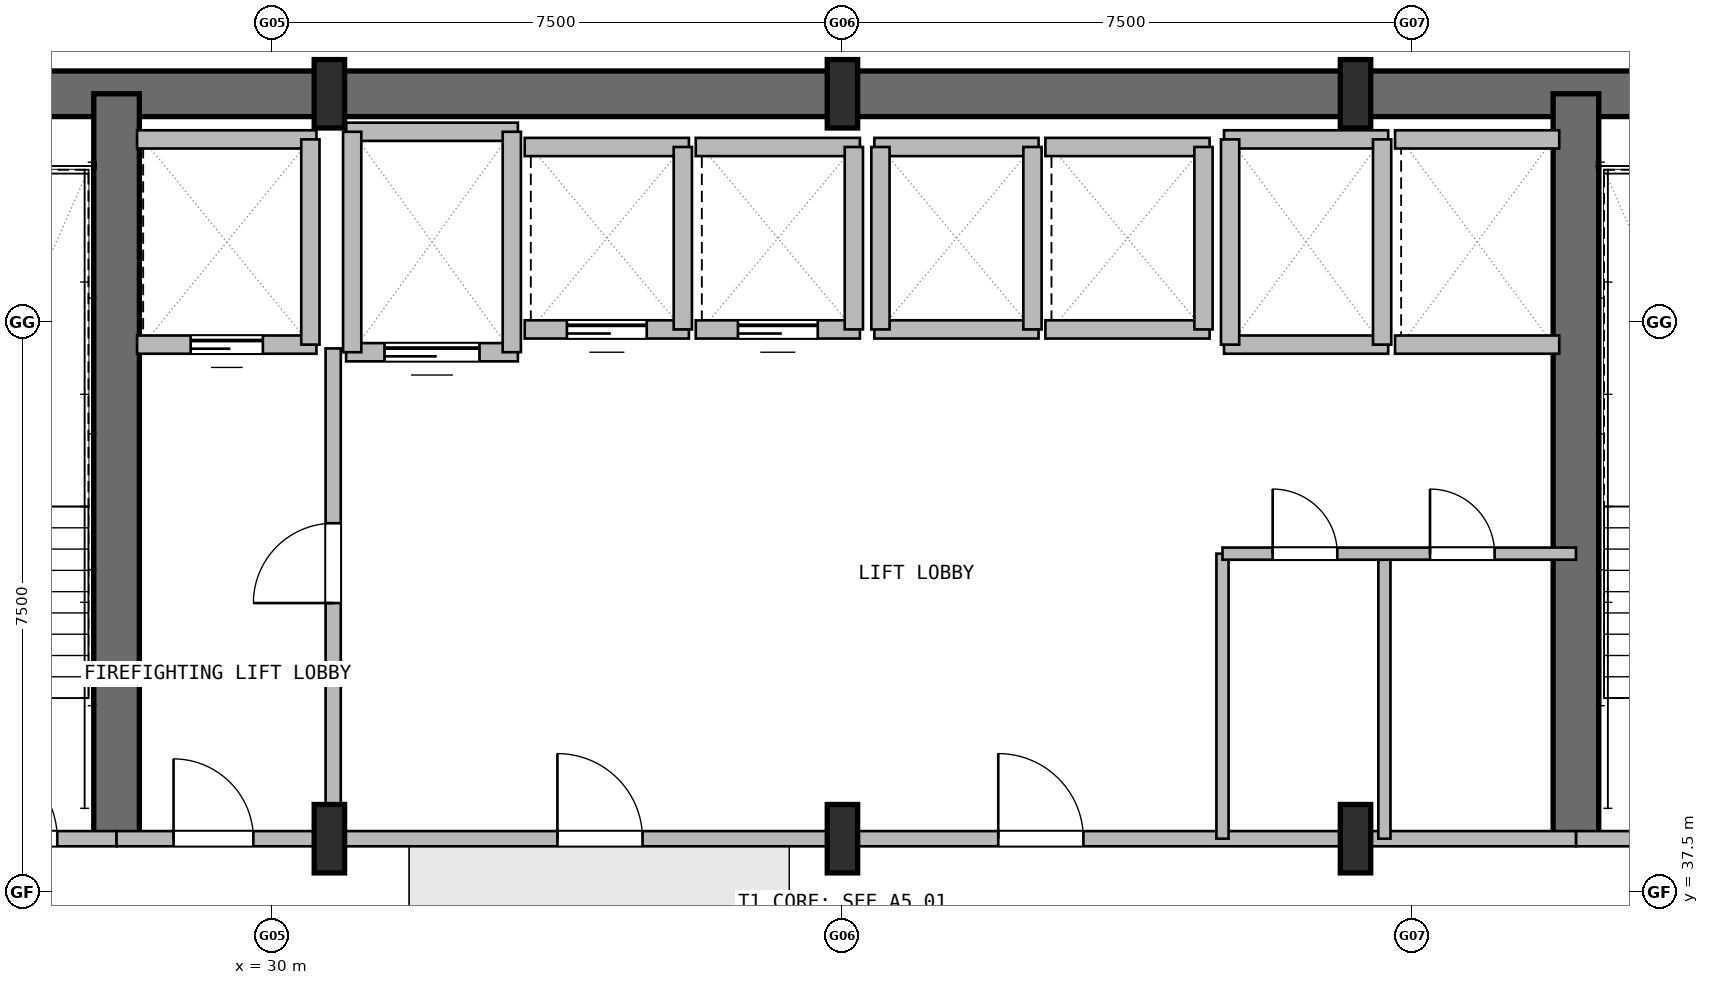
"""IFC4 building model, lengths in metres.
Left out: names, types, materials, properties, quantities, classifications, styles, units other than length and angle.
Written with IfcOpenShell. Run it as: python <this file> out.ifc"""

import sys

from ifc_helpers import new_model, si_unit, direction, frame, frame_2d, origin, origin_2d, place, context, subcontext, project, spatial, rectangle, i_section, extrude, element, fill, save


model = new_model("IFC4")
c1 = context("Model", 3, precision=1e-05, world=origin(), true_north=direction((0.0, 1.0)))
c2 = subcontext(c1, "Body", "Model", "MODEL_VIEW")
j1 = project(units=[si_unit("LENGTHUNIT", "METRE"), si_unit("PLANEANGLEUNIT", "RADIAN")], contexts=[c1])
p1 = place(None, origin())
s1 = spatial("IfcSite", under=j1, at=p1, CompositionType="ELEMENT")
p2 = place(p1, origin())
s2 = spatial("IfcBuilding", under=s1, at=p2, CompositionType="ELEMENT")
p3 = place(p2, frame((0.0, 0.0, 30.6)))
s3 = spatial("IfcBuildingStorey", under=s2, at=p3, CompositionType="ELEMENT", Elevation=30.6)
p4 = place(p3, frame((23.7, 48.0, 0.0), z_axis=(0.0, 0.0, 1.0), x_axis=(1.0, 0.0, 0.0)))
e1 = element("IfcWall", 1, at=p4, inside=s3, PredefinedType="SHEAR", context=c2, shape_type="SweptSolid", body=[
    extrude(rectangle(XDim=27.6, YDim=0.6, at=frame_2d((13.8, 0.0))), origin(), (0.0, 0.0, 1.0), 3.3),
])
for number, where, z_axis, x_axis in (
    (2, (27.95, 38.2, 0.0), (0.0, 0.0, 1.0), (0.0, 1.0, 0.0)),
    (3, (47.15, 38.2, 0.0), (0.0, 0.0, 1.0), (0.0, 1.0, 0.0)),
):
    element("IfcWall", number, at=place(p3, frame(where, z_axis=z_axis, x_axis=x_axis)), inside=s3, PredefinedType="SHEAR", context=c2, shape_type="SweptSolid", body=[
        extrude(rectangle(XDim=9.8, YDim=0.6, at=frame_2d((4.9, 0.0))), origin(), (0.0, 0.0, 1.0), 3.3),
    ])
for number, where, z_axis, x_axis in (
    (4, (30.75, 38.2, 0.0), (0.0, 0.0, 1.0), (1.0, 0.0, 0.0)),
    (5, (30.75, 48.0, 0.0), (0.0, 0.0, 1.0), (1.0, 0.0, 0.0)),
    (6, (37.5, 38.2, 0.0), (0.0, 0.0, 1.0), (1.0, 0.0, 0.0)),
    (7, (37.5, 48.0, 0.0), (0.0, 0.0, 1.0), (1.0, 0.0, 0.0)),
    (8, (44.25, 38.2, 0.0), (0.0, 0.0, 1.0), (1.0, 0.0, 0.0)),
    (9, (44.25, 48.0, 0.0), (0.0, 0.0, 1.0), (1.0, 0.0, 0.0)),
):
    element("IfcColumn", number, at=place(p3, frame(where, z_axis=z_axis, x_axis=x_axis)), inside=s3, PredefinedType="COLUMN", context=c2, shape_type="SweptSolid", body=[
        extrude(i_section(OverallWidth=0.4, OverallDepth=0.9, WebThickness=0.02, FlangeThickness=0.036, at=origin_2d()), origin(), (0.0, 0.0, 1.0), 3.3),
    ])
p5 = place(p3, frame((24.0, 38.2, 0.0), z_axis=(0.0, 0.0, 1.0), x_axis=(1.0, 0.0, 0.0)))
e10 = element("IfcWall", 10, at=p5, inside=s3, PredefinedType="PARTITIONING", context=c2, shape_type="SweptSolid", body=[
    extrude(rectangle(XDim=3.95, YDim=0.2, at=frame_2d((1.975, 0.0))), origin(), (0.0, 0.0, 1.0), 2.33),
])
p6 = place(p5, frame((2.05, 0.0, 0.0)))
e11 = element("IfcOpeningElement", 11, at=p6, cuts=e10, PredefinedType="OPENING", context=c2, shape_type="SweptSolid", body=[
    extrude(rectangle(XDim=1.12, YDim=2.1, at=frame_2d((0.56, 1.05))), frame((0.0, 0.11, 0.0), z_axis=(0.0, -1.0, 0.0), x_axis=(1.0, 0.0, 0.0)), (0.0, 0.0, 1.0), 0.22),
])
p7 = place(p3, frame((47.15, 38.2, 0.0), z_axis=(0.0, 0.0, 1.0), x_axis=(1.0, 0.0, 0.0)))
e12 = element("IfcWall", 12, at=p7, inside=s3, PredefinedType="PARTITIONING", context=c2, shape_type="SweptSolid", body=[
    extrude(rectangle(XDim=3.85, YDim=0.2, at=frame_2d((1.925, 0.0))), origin(), (0.0, 0.0, 1.0), 2.33),
])
p8 = place(p7, frame((0.75, 0.0, 0.0)))
e13 = element("IfcOpeningElement", 13, at=p8, cuts=e12, PredefinedType="OPENING", context=c2, shape_type="SweptSolid", body=[
    extrude(rectangle(XDim=1.12, YDim=2.1, at=frame_2d((0.56, 1.05))), frame((0.0, 0.11, 0.0), z_axis=(0.0, -1.0, 0.0), x_axis=(1.0, 0.0, 0.0)), (0.0, 0.0, 1.0), 0.22),
])
p9 = place(p3, frame((30.8, 38.2, 0.0), z_axis=(0.0, 0.0, 1.0), x_axis=(0.0, 1.0, 0.0)))
e14 = element("IfcWall", 14, at=p9, inside=s3, PredefinedType="PARTITIONING", context=c2, shape_type="SweptSolid", body=[
    extrude(rectangle(XDim=6.45, YDim=0.2, at=frame_2d((3.225, 0.0))), origin(), (0.0, 0.0, 1.0), 2.33),
])
p10 = place(p9, frame((3.1, 0.0, 0.0)))
e15 = element("IfcOpeningElement", 15, at=p10, cuts=e14, PredefinedType="OPENING", context=c2, shape_type="SweptSolid", body=[
    extrude(rectangle(XDim=1.05, YDim=2.1, at=frame_2d((0.525, 1.05))), frame((0.0, 0.11, 0.0), z_axis=(0.0, -1.0, 0.0), x_axis=(1.0, 0.0, 0.0)), (0.0, 0.0, 1.0), 0.22),
])
p11 = place(p3, frame((27.95, 38.2, 0.0), z_axis=(0.0, 0.0, 1.0), x_axis=(1.0, 0.0, 0.0)))
e16 = element("IfcWall", 16, at=p11, inside=s3, PredefinedType="PARTITIONING", context=c2, shape_type="SweptSolid", body=[
    extrude(rectangle(XDim=2.85, YDim=0.2, at=frame_2d((1.425, 0.0))), origin(), (0.0, 0.0, 1.0), 2.33),
])
p12 = place(p11, frame((0.75, 0.0, 0.0)))
e17 = element("IfcOpeningElement", 17, at=p12, cuts=e16, PredefinedType="OPENING", context=c2, shape_type="SweptSolid", body=[
    extrude(rectangle(XDim=1.05, YDim=2.1, at=frame_2d((0.525, 1.05))), frame((0.0, 0.11, 0.0), z_axis=(0.0, -1.0, 0.0), x_axis=(1.0, 0.0, 0.0)), (0.0, 0.0, 1.0), 0.22),
])
p13 = place(p3, frame((30.8, 38.2, 0.0), z_axis=(0.0, 0.0, 1.0), x_axis=(1.0, 0.0, 0.0)))
e18 = element("IfcWall", 18, at=p13, inside=s3, PredefinedType="PARTITIONING", context=c2, shape_type="SweptSolid", body=[
    extrude(rectangle(XDim=16.35, YDim=0.2, at=frame_2d((8.175, 0.0))), origin(), (0.0, 0.0, 1.0), 2.33),
])
p14 = place(p13, frame((2.95, 0.0, 0.0)))
e19 = element("IfcOpeningElement", 19, at=p14, cuts=e18, PredefinedType="OPENING", context=c2, shape_type="SweptSolid", body=[
    extrude(rectangle(XDim=1.12, YDim=2.1, at=frame_2d((0.56, 1.05))), frame((0.0, 0.11, 0.0), z_axis=(0.0, -1.0, 0.0), x_axis=(1.0, 0.0, 0.0)), (0.0, 0.0, 1.0), 0.22),
])
p15 = place(p13, frame((8.75, 0.0, 0.0)))
e20 = element("IfcOpeningElement", 20, at=p15, cuts=e18, PredefinedType="OPENING", context=c2, shape_type="SweptSolid", body=[
    extrude(rectangle(XDim=1.12, YDim=2.1, at=frame_2d((0.56, 1.05))), frame((0.0, 0.11, 0.0), z_axis=(0.0, -1.0, 0.0), x_axis=(1.0, 0.0, 0.0)), (0.0, 0.0, 1.0), 0.22),
])
p16 = place(p3, frame((28.22, 44.7, 0.0), z_axis=(0.0, 0.0, 1.0), x_axis=(1.0, 0.0, 0.0)))
e21 = element("IfcWall", 21, at=p16, inside=s3, PredefinedType="PARTITIONING", context=c2, shape_type="SweptSolid", body=[
    extrude(rectangle(XDim=2.36, YDim=0.24, at=frame_2d((1.18, 0.0))), origin(), (0.0, 0.0, 1.0), 2.73),
])
p17 = place(p16, frame((0.705, 0.0, 0.0)))
e22 = element("IfcOpeningElement", 22, at=p17, cuts=e21, PredefinedType="OPENING", context=c2, shape_type="SweptSolid", body=[
    extrude(rectangle(XDim=0.95, YDim=2.15, at=frame_2d((0.475, 1.075))), frame((0.0, 0.13, 0.0), z_axis=(0.0, -1.0, 0.0), x_axis=(1.0, 0.0, 0.0)), (0.0, 0.0, 1.0), 0.26),
])
p18 = place(p3, frame((28.22, 47.4, 0.0), z_axis=(0.0, 0.0, 1.0), x_axis=(1.0, 0.0, 0.0)))
e23 = element("IfcWall", 23, at=p18, inside=s3, PredefinedType="PARTITIONING", context=c2, shape_type="SweptSolid", body=[
    extrude(rectangle(XDim=2.36, YDim=0.24, at=frame_2d((1.18, 0.0))), origin(), (0.0, 0.0, 1.0), 3.03),
])
p19 = place(p3, frame((30.5, 44.7, 0.0), z_axis=(0.0, 0.0, 1.0), x_axis=(0.0, 1.0, 0.0)))
e24 = element("IfcWall", 24, at=p19, inside=s3, PredefinedType="PARTITIONING", context=c2, shape_type="SweptSolid", body=[
    extrude(rectangle(XDim=2.7, YDim=0.24, at=frame_2d((1.35, 0.0))), origin(), (0.0, 0.0, 1.0), 2.33),
])
p20 = place(p3, frame((30.97, 44.6, 0.0), z_axis=(0.0, 0.0, 1.0), x_axis=(1.0, 0.0, 0.0)))
e25 = element("IfcWall", 25, at=p20, inside=s3, PredefinedType="PARTITIONING", context=c2, shape_type="SweptSolid", body=[
    extrude(rectangle(XDim=2.26, YDim=0.24, at=frame_2d((1.13, 0.0))), origin(), (0.0, 0.0, 1.0), 3.03),
])
p21 = place(p20, frame((0.505, 0.0, 0.0)))
e26 = element("IfcOpeningElement", 26, at=p21, cuts=e25, PredefinedType="OPENING", context=c2, shape_type="SweptSolid", body=[
    extrude(rectangle(XDim=1.25, YDim=2.2, at=frame_2d((0.625, 1.1))), frame((0.0, 0.13, 0.0), z_axis=(0.0, -1.0, 0.0), x_axis=(1.0, 0.0, 0.0)), (0.0, 0.0, 1.0), 0.26),
])
p22 = place(p3, frame((30.97, 47.5, 0.0), z_axis=(0.0, 0.0, 1.0), x_axis=(1.0, 0.0, 0.0)))
e27 = element("IfcWall", 27, at=p22, inside=s3, PredefinedType="PARTITIONING", context=c2, shape_type="SweptSolid", body=[
    extrude(rectangle(XDim=2.26, YDim=0.24, at=frame_2d((1.13, 0.0))), origin(), (0.0, 0.0, 1.0), 3.03),
])
for number, where, z_axis, x_axis in (
    (28, (31.05, 44.6, 0.0), (0.0, 0.0, 1.0), (0.0, 1.0, 0.0)),
    (29, (33.15, 44.6, 0.0), (0.0, 0.0, 1.0), (0.0, 1.0, 0.0)),
):
    element("IfcWall", number, at=place(p3, frame(where, z_axis=z_axis, x_axis=x_axis)), inside=s3, PredefinedType="PARTITIONING", context=c2, shape_type="SweptSolid", body=[
        extrude(rectangle(XDim=2.9, YDim=0.24, at=frame_2d((1.45, 0.0))), origin(), (0.0, 0.0, 1.0), 3.03),
    ])
p23 = place(p3, frame((33.32, 44.9, 0.0), z_axis=(0.0, 0.0, 1.0), x_axis=(1.0, 0.0, 0.0)))
e30 = element("IfcWall", 30, at=p23, inside=s3, PredefinedType="PARTITIONING", context=c2, shape_type="SweptSolid", body=[
    extrude(rectangle(XDim=2.16, YDim=0.24, at=frame_2d((1.08, 0.0))), origin(), (0.0, 0.0, 1.0), 3.03),
])
p24 = place(p23, frame((0.555, 0.0, 0.0)))
e31 = element("IfcOpeningElement", 31, at=p24, cuts=e30, PredefinedType="OPENING", context=c2, shape_type="SweptSolid", body=[
    extrude(rectangle(XDim=1.05, YDim=2.15, at=frame_2d((0.525, 1.075))), frame((0.0, 0.13, 0.0), z_axis=(0.0, -1.0, 0.0), x_axis=(1.0, 0.0, 0.0)), (0.0, 0.0, 1.0), 0.26),
])
p25 = place(p3, frame((33.32, 47.3, 0.0), z_axis=(0.0, 0.0, 1.0), x_axis=(1.0, 0.0, 0.0)))
e32 = element("IfcWall", 32, at=p25, inside=s3, PredefinedType="PARTITIONING", context=c2, shape_type="SweptSolid", body=[
    extrude(rectangle(XDim=2.16, YDim=0.24, at=frame_2d((1.08, 0.0))), origin(), (0.0, 0.0, 1.0), 3.03),
])
p26 = place(p3, frame((35.4, 44.9, 0.0), z_axis=(0.0, 0.0, 1.0), x_axis=(0.0, 1.0, 0.0)))
e33 = element("IfcWall", 33, at=p26, inside=s3, PredefinedType="PARTITIONING", context=c2, shape_type="SweptSolid", body=[
    extrude(rectangle(XDim=2.4, YDim=0.24, at=frame_2d((1.2, 0.0))), origin(), (0.0, 0.0, 1.0), 3.03),
])
p27 = place(p3, frame((35.57, 44.9, 0.0), z_axis=(0.0, 0.0, 1.0), x_axis=(1.0, 0.0, 0.0)))
e34 = element("IfcWall", 34, at=p27, inside=s3, PredefinedType="PARTITIONING", context=c2, shape_type="SweptSolid", body=[
    extrude(rectangle(XDim=2.16, YDim=0.24, at=frame_2d((1.08, 0.0))), origin(), (0.0, 0.0, 1.0), 3.03),
])
p28 = place(p27, frame((0.555, 0.0, 0.0)))
e35 = element("IfcOpeningElement", 35, at=p28, cuts=e34, PredefinedType="OPENING", context=c2, shape_type="SweptSolid", body=[
    extrude(rectangle(XDim=1.05, YDim=2.15, at=frame_2d((0.525, 1.075))), frame((0.0, 0.13, 0.0), z_axis=(0.0, -1.0, 0.0), x_axis=(1.0, 0.0, 0.0)), (0.0, 0.0, 1.0), 0.26),
])
p29 = place(p3, frame((35.57, 47.3, 0.0), z_axis=(0.0, 0.0, 1.0), x_axis=(1.0, 0.0, 0.0)))
e36 = element("IfcWall", 36, at=p29, inside=s3, PredefinedType="PARTITIONING", context=c2, shape_type="SweptSolid", body=[
    extrude(rectangle(XDim=2.16, YDim=0.24, at=frame_2d((1.08, 0.0))), origin(), (0.0, 0.0, 1.0), 3.03),
])
p30 = place(p3, frame((37.65, 44.9, 0.0), z_axis=(0.0, 0.0, 1.0), x_axis=(0.0, 1.0, 0.0)))
e37 = element("IfcWall", 37, at=p30, inside=s3, PredefinedType="PARTITIONING", context=c2, shape_type="SweptSolid", body=[
    extrude(rectangle(XDim=2.4, YDim=0.24, at=frame_2d((1.2, 0.0))), origin(), (0.0, 0.0, 1.0), 3.03),
])
for number, where, z_axis, x_axis in (
    (38, (37.92, 44.9, 0.0), (0.0, 0.0, 1.0), (1.0, 0.0, 0.0)),
    (39, (37.92, 47.3, 0.0), (0.0, 0.0, 1.0), (1.0, 0.0, 0.0)),
):
    element("IfcWall", number, at=place(p3, frame(where, z_axis=z_axis, x_axis=x_axis)), inside=s3, PredefinedType="PARTITIONING", context=c2, shape_type="SweptSolid", body=[
        extrude(rectangle(XDim=2.16, YDim=0.24, at=frame_2d((1.08, 0.0))), origin(), (0.0, 0.0, 1.0), 3.03),
    ])
for number, where, z_axis, x_axis in (
    (40, (38.0, 44.9, 0.0), (0.0, 0.0, 1.0), (0.0, 1.0, 0.0)),
    (41, (40.0, 44.9, 0.0), (0.0, 0.0, 1.0), (0.0, 1.0, 0.0)),
):
    element("IfcWall", number, at=place(p3, frame(where, z_axis=z_axis, x_axis=x_axis)), inside=s3, PredefinedType="PARTITIONING", context=c2, shape_type="SweptSolid", body=[
        extrude(rectangle(XDim=2.4, YDim=0.24, at=frame_2d((1.2, 0.0))), origin(), (0.0, 0.0, 1.0), 3.03),
    ])
for number, where, z_axis, x_axis in (
    (42, (40.17, 44.9, 0.0), (0.0, 0.0, 1.0), (1.0, 0.0, 0.0)),
    (43, (40.17, 47.3, 0.0), (0.0, 0.0, 1.0), (1.0, 0.0, 0.0)),
):
    element("IfcWall", number, at=place(p3, frame(where, z_axis=z_axis, x_axis=x_axis)), inside=s3, PredefinedType="PARTITIONING", context=c2, shape_type="SweptSolid", body=[
        extrude(rectangle(XDim=2.16, YDim=0.24, at=frame_2d((1.08, 0.0))), origin(), (0.0, 0.0, 1.0), 3.03),
    ])
p31 = place(p3, frame((42.25, 44.9, 0.0), z_axis=(0.0, 0.0, 1.0), x_axis=(0.0, 1.0, 0.0)))
e44 = element("IfcWall", 44, at=p31, inside=s3, PredefinedType="PARTITIONING", context=c2, shape_type="SweptSolid", body=[
    extrude(rectangle(XDim=2.4, YDim=0.24, at=frame_2d((1.2, 0.0))), origin(), (0.0, 0.0, 1.0), 3.03),
])
for number, where, z_axis, x_axis in (
    (45, (42.52, 44.7, 0.0), (0.0, 0.0, 1.0), (1.0, 0.0, 0.0)),
    (46, (42.52, 47.4, 0.0), (0.0, 0.0, 1.0), (1.0, 0.0, 0.0)),
):
    element("IfcWall", number, at=place(p3, frame(where, z_axis=z_axis, x_axis=x_axis)), inside=s3, PredefinedType="PARTITIONING", context=c2, shape_type="SweptSolid", body=[
        extrude(rectangle(XDim=2.16, YDim=0.24, at=frame_2d((1.08, 0.0))), origin(), (0.0, 0.0, 1.0), 3.03),
    ])
for number, where, z_axis, x_axis in (
    (47, (42.6, 44.7, 0.0), (0.0, 0.0, 1.0), (0.0, 1.0, 0.0)),
    (48, (44.6, 44.7, 0.0), (0.0, 0.0, 1.0), (0.0, 1.0, 0.0)),
):
    element("IfcWall", number, at=place(p3, frame(where, z_axis=z_axis, x_axis=x_axis)), inside=s3, PredefinedType="PARTITIONING", context=c2, shape_type="SweptSolid", body=[
        extrude(rectangle(XDim=2.7, YDim=0.24, at=frame_2d((1.35, 0.0))), origin(), (0.0, 0.0, 1.0), 3.03),
    ])
for number, where, z_axis, x_axis in (
    (49, (44.77, 44.7, 0.0), (0.0, 0.0, 1.0), (1.0, 0.0, 0.0)),
    (50, (44.77, 47.4, 0.0), (0.0, 0.0, 1.0), (1.0, 0.0, 0.0)),
):
    element("IfcWall", number, at=place(p3, frame(where, z_axis=z_axis, x_axis=x_axis)), inside=s3, PredefinedType="PARTITIONING", context=c2, shape_type="SweptSolid", body=[
        extrude(rectangle(XDim=2.16, YDim=0.24, at=frame_2d((1.08, 0.0))), origin(), (0.0, 0.0, 1.0), 3.03),
    ])
for number, where, z_axis, x_axis in (
    (51, (42.5, 38.2, 0.0), (0.0, 0.0, 1.0), (0.0, 1.0, 0.0)),
    (52, (44.63, 38.2, 0.0), (0.0, 0.0, 1.0), (0.0, 1.0, 0.0)),
):
    element("IfcWall", number, at=place(p3, frame(where, z_axis=z_axis, x_axis=x_axis)), inside=s3, PredefinedType="PARTITIONING", context=c2, shape_type="SweptSolid", body=[
        extrude(rectangle(XDim=3.75, YDim=0.16, at=frame_2d((1.875, 0.0))), origin(), (0.0, 0.0, 1.0), 3.03),
    ])
p32 = place(p3, frame((42.5, 41.95, 0.0), z_axis=(0.0, 0.0, 1.0), x_axis=(1.0, 0.0, 0.0)))
e53 = element("IfcWall", 53, at=p32, inside=s3, PredefinedType="PARTITIONING", context=c2, shape_type="SweptSolid", body=[
    extrude(rectangle(XDim=4.65, YDim=0.16, at=frame_2d((2.325, 0.0))), origin(), (0.0, 0.0, 1.0), 3.03),
])
p33 = place(p32, frame((0.66, 0.0, 0.0)))
e54 = element("IfcOpeningElement", 54, at=p33, cuts=e53, PredefinedType="OPENING", context=c2, shape_type="SweptSolid", body=[
    extrude(rectangle(XDim=0.85, YDim=2.05, at=frame_2d((0.425, 1.025))), frame((0.0, 0.09, 0.0), z_axis=(0.0, -1.0, 0.0), x_axis=(1.0, 0.0, 0.0)), (0.0, 0.0, 1.0), 0.18),
])
p34 = place(p32, frame((2.73, 0.0, 0.0)))
e55 = element("IfcOpeningElement", 55, at=p34, cuts=e53, PredefinedType="OPENING", context=c2, shape_type="SweptSolid", body=[
    extrude(rectangle(XDim=0.85, YDim=2.05, at=frame_2d((0.425, 1.025))), frame((0.0, 0.09, 0.0), z_axis=(0.0, -1.0, 0.0), x_axis=(1.0, 0.0, 0.0)), (0.0, 0.0, 1.0), 0.18),
])
p35 = place(p6, origin())
e56 = element("IfcDoor", 56, at=p35, inside=s3, OperationType="SINGLE_SWING_LEFT", PredefinedType="DOOR", context=c2, shape_type="SweptSolid", body=[
    extrude(rectangle(XDim=1.12, YDim=2.1, at=frame_2d((0.56, 1.05))), frame((0.0, 0.025, 0.0), z_axis=(0.0, -1.0, 0.0), x_axis=(1.0, 0.0, 0.0)), (0.0, 0.0, 1.0), 0.05),
])
fill(e11, e56)
p36 = place(p10, origin())
e57 = element("IfcDoor", 57, at=p36, inside=s3, OperationType="SINGLE_SWING_LEFT", PredefinedType="DOOR", context=c2, shape_type="SweptSolid", body=[
    extrude(rectangle(XDim=1.05, YDim=2.1, at=frame_2d((0.525, 1.05))), frame((0.0, 0.025, 0.0), z_axis=(0.0, -1.0, 0.0), x_axis=(1.0, 0.0, 0.0)), (0.0, 0.0, 1.0), 0.05),
])
fill(e15, e57)
p37 = place(p12, origin())
e58 = element("IfcDoor", 58, at=p37, inside=s3, OperationType="SINGLE_SWING_RIGHT", PredefinedType="DOOR", context=c2, shape_type="SweptSolid", body=[
    extrude(rectangle(XDim=1.05, YDim=2.1, at=frame_2d((0.525, 1.05))), frame((0.0, 0.025, 0.0), z_axis=(0.0, -1.0, 0.0), x_axis=(1.0, 0.0, 0.0)), (0.0, 0.0, 1.0), 0.05),
])
fill(e17, e58)
p38 = place(p14, origin())
e59 = element("IfcDoor", 59, at=p38, inside=s3, OperationType="SINGLE_SWING_LEFT", PredefinedType="DOOR", context=c2, shape_type="SweptSolid", body=[
    extrude(rectangle(XDim=1.12, YDim=2.1, at=frame_2d((0.56, 1.05))), frame((0.0, 0.025, 0.0), z_axis=(0.0, -1.0, 0.0), x_axis=(1.0, 0.0, 0.0)), (0.0, 0.0, 1.0), 0.05),
])
fill(e19, e59)
p39 = place(p15, origin())
e60 = element("IfcDoor", 60, at=p39, inside=s3, OperationType="SINGLE_SWING_RIGHT", PredefinedType="DOOR", context=c2, shape_type="SweptSolid", body=[
    extrude(rectangle(XDim=1.12, YDim=2.1, at=frame_2d((0.56, 1.05))), frame((0.0, 0.025, 0.0), z_axis=(0.0, -1.0, 0.0), x_axis=(1.0, 0.0, 0.0)), (0.0, 0.0, 1.0), 0.05),
])
fill(e20, e60)
p40 = place(p17, origin())
e61 = element("IfcDoor", 61, at=p40, inside=s3, OperationType="SLIDING_TO_LEFT", PredefinedType="DOOR", context=c2, shape_type="SweptSolid", body=[
    extrude(rectangle(XDim=0.95, YDim=2.15, at=frame_2d((0.475, 1.075))), frame((0.0, 0.025, 0.0), z_axis=(0.0, -1.0, 0.0), x_axis=(1.0, 0.0, 0.0)), (0.0, 0.0, 1.0), 0.05),
])
fill(e22, e61)
p41 = place(p21, origin())
e62 = element("IfcDoor", 62, at=p41, inside=s3, OperationType="SLIDING_TO_LEFT", PredefinedType="DOOR", context=c2, shape_type="SweptSolid", body=[
    extrude(rectangle(XDim=1.25, YDim=2.2, at=frame_2d((0.625, 1.1))), frame((0.0, 0.025, 0.0), z_axis=(0.0, -1.0, 0.0), x_axis=(1.0, 0.0, 0.0)), (0.0, 0.0, 1.0), 0.05),
])
fill(e26, e62)
p42 = place(p24, origin())
e63 = element("IfcDoor", 63, at=p42, inside=s3, OperationType="SLIDING_TO_LEFT", PredefinedType="DOOR", context=c2, shape_type="SweptSolid", body=[
    extrude(rectangle(XDim=1.05, YDim=2.15, at=frame_2d((0.525, 1.075))), frame((0.0, 0.025, 0.0), z_axis=(0.0, -1.0, 0.0), x_axis=(1.0, 0.0, 0.0)), (0.0, 0.0, 1.0), 0.05),
])
fill(e31, e63)
p43 = place(p28, origin())
e64 = element("IfcDoor", 64, at=p43, inside=s3, OperationType="SLIDING_TO_LEFT", PredefinedType="DOOR", context=c2, shape_type="SweptSolid", body=[
    extrude(rectangle(XDim=1.05, YDim=2.15, at=frame_2d((0.525, 1.075))), frame((0.0, 0.025, 0.0), z_axis=(0.0, -1.0, 0.0), x_axis=(1.0, 0.0, 0.0)), (0.0, 0.0, 1.0), 0.05),
])
fill(e35, e64)
p44 = place(p33, origin())
e65 = element("IfcDoor", 65, at=p44, inside=s3, OperationType="SINGLE_SWING_RIGHT", PredefinedType="DOOR", context=c2, shape_type="SweptSolid", body=[
    extrude(rectangle(XDim=0.85, YDim=2.05, at=frame_2d((0.425, 1.025))), frame((0.0, 0.025, 0.0), z_axis=(0.0, -1.0, 0.0), x_axis=(1.0, 0.0, 0.0)), (0.0, 0.0, 1.0), 0.05),
])
fill(e54, e65)
p45 = place(p34, origin())
e66 = element("IfcDoor", 66, at=p45, inside=s3, OperationType="SINGLE_SWING_LEFT", PredefinedType="DOOR", context=c2, shape_type="SweptSolid", body=[
    extrude(rectangle(XDim=0.85, YDim=2.05, at=frame_2d((0.425, 1.025))), frame((0.0, 0.025, 0.0), z_axis=(0.0, -1.0, 0.0), x_axis=(1.0, 0.0, 0.0)), (0.0, 0.0, 1.0), 0.05),
])
fill(e55, e66)
save(model, sys.argv[1])
